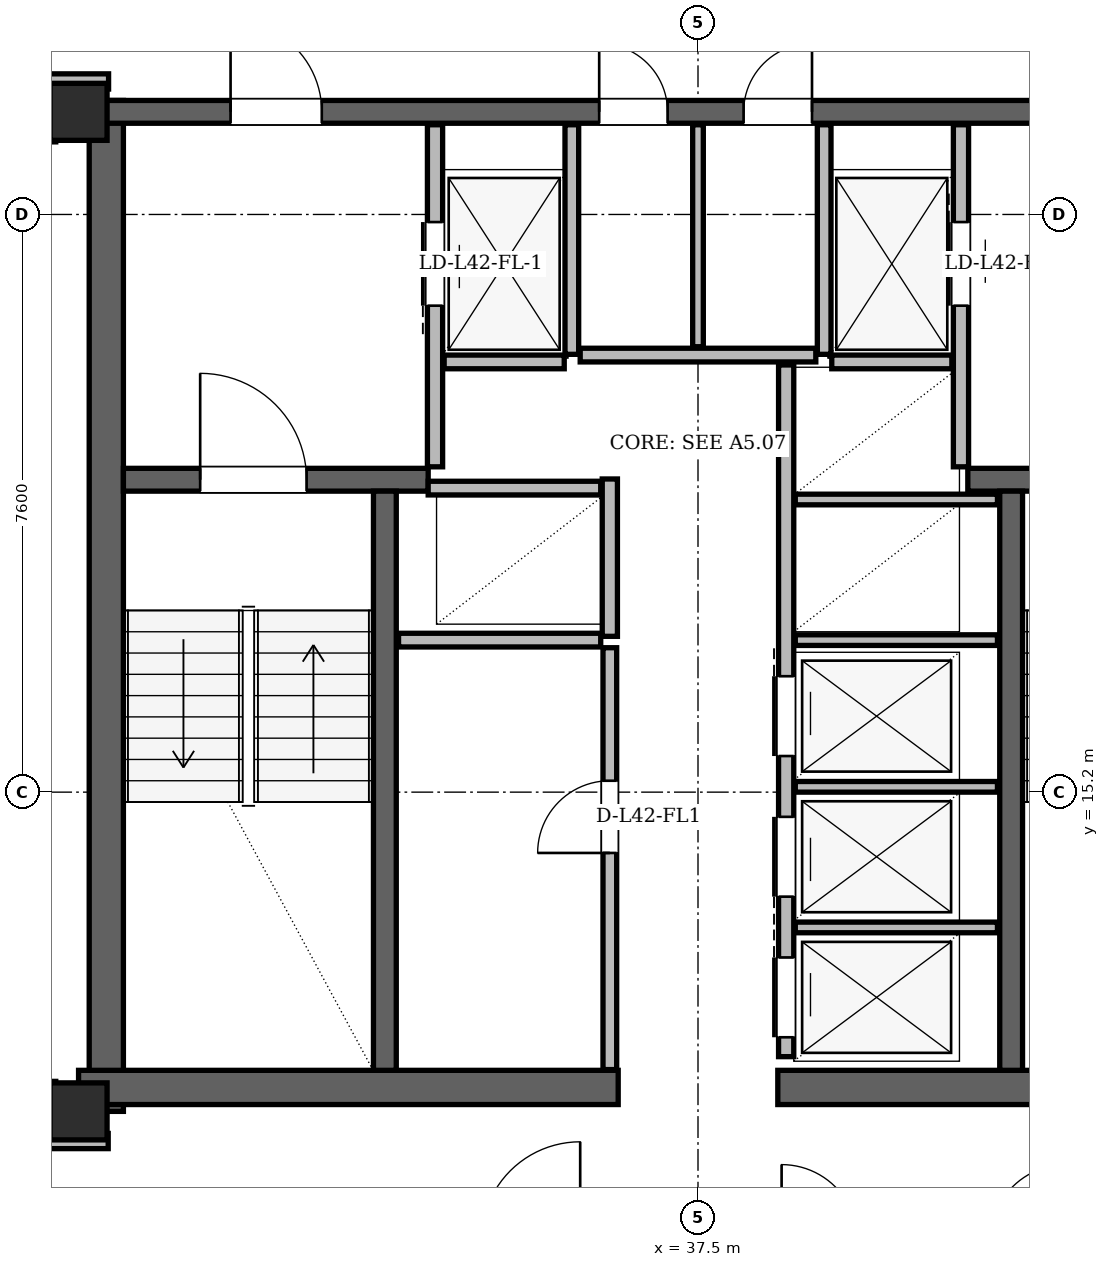
"""IFC4 building model, lengths in metres.
Left out: names, types, materials, properties, quantities, classifications, styles, units other than length and angle.
Written with IfcOpenShell. Run it as: python <this file> out.ifc"""

import sys

from ifc_helpers import new_model, si_unit, direction, frame, frame_2d, origin, origin_2d, place, context, subcontext, project, spatial, rectangle, hollow_rectangle, extrude, element, fill, save


model = new_model("IFC4")
c1 = context("Model", 3, precision=1e-05, world=origin(), true_north=direction((0.0, 1.0)))
c2 = subcontext(c1, "Body", "Model", "MODEL_VIEW")
j1 = project(units=[si_unit("LENGTHUNIT", "METRE"), si_unit("PLANEANGLEUNIT", "RADIAN")], contexts=[c1])
p1 = place(None, origin())
s1 = spatial("IfcSite", under=j1, at=p1, CompositionType="ELEMENT")
p2 = place(p1, origin())
s2 = spatial("IfcBuilding", under=s1, at=p2, CompositionType="ELEMENT")
p3 = place(p2, frame((0.0, 0.0, 160.2)))
s3 = spatial("IfcBuildingStorey", under=s2, at=p3, CompositionType="ELEMENT", Elevation=160.2)
for number, where, z_axis, x_axis in (
    (1, (29.35, 11.0, 0.0), (0.0, 0.0, 1.0), (1.0, 0.0, 0.0)),
    (2, (29.35, 24.15, 0.0), (0.0, 0.0, 1.0), (1.0, 0.0, 0.0)),
):
    element("IfcColumn", number, at=place(p3, frame(where, z_axis=z_axis, x_axis=x_axis)), inside=s3, PredefinedType="COLUMN", context=c2, shape_type="SweptSolid", body=[
        extrude(hollow_rectangle(XDim=0.75, YDim=0.75, WallThickness=0.06, at=origin_2d()), origin(), (0.0, 0.0, 1.0), 3.6),
    ])
p4 = place(p3, frame((29.715, 11.0, 0.0), z_axis=(0.0, 0.0, 1.0), x_axis=(0.0, 1.0, 0.0)))
e3 = element("IfcWall", 3, at=p4, inside=s3, PredefinedType="SHEAR", context=c2, shape_type="SweptSolid", body=[
    extrude(rectangle(XDim=13.3, YDim=0.45, at=frame_2d((6.65, 0.0))), origin(), (0.0, 0.0, 1.0), 3.38),
])
for number, where, z_axis, x_axis in (
    (4, (29.35, 11.315, 0.0), (0.0, 0.0, 1.0), (1.0, 0.0, 0.0)),
    (5, (38.55, 11.315, 0.0), (0.0, 0.0, 1.0), (1.0, 0.0, 0.0)),
):
    element("IfcWall", number, at=place(p3, frame(where, z_axis=z_axis, x_axis=x_axis)), inside=s3, PredefinedType="SHEAR", context=c2, shape_type="SweptSolid", body=[
        extrude(rectangle(XDim=7.1, YDim=0.45, at=frame_2d((3.55, 0.0))), origin(), (0.0, 0.0, 1.0), 3.38),
    ])
p5 = place(p3, frame((29.65, 24.15, 0.0), z_axis=(0.0, 0.0, 1.0), x_axis=(1.0, 0.0, 0.0)))
e6 = element("IfcWall", 6, at=p5, inside=s3, PredefinedType="SHEAR", context=c2, shape_type="SweptSolid", body=[
    extrude(rectangle(XDim=15.7, YDim=0.3, at=frame_2d((7.85, 0.0))), origin(), (0.0, 0.0, 1.0), 3.38),
])
p6 = place(p5, frame((1.7, 0.0, 0.0)))
e7 = element("IfcOpeningElement", 7, at=p6, cuts=e6, PredefinedType="OPENING", context=c2, shape_type="SweptSolid", body=[
    extrude(rectangle(XDim=1.2, YDim=2.2, at=frame_2d((0.6, 1.1))), frame((0.0, 0.15, 0.0), z_axis=(0.0, -1.0, 0.0), x_axis=(1.0, 0.0, 0.0)), (0.0, 0.0, 1.0), 0.3),
])
p7 = place(p5, frame((12.8, 0.0, 0.0)))
e8 = element("IfcOpeningElement", 8, at=p7, cuts=e6, PredefinedType="OPENING", context=c2, shape_type="SweptSolid", body=[
    extrude(rectangle(XDim=1.2, YDim=2.2, at=frame_2d((0.6, 1.1))), frame((0.0, 0.15, 0.0), z_axis=(0.0, -1.0, 0.0), x_axis=(1.0, 0.0, 0.0)), (0.0, 0.0, 1.0), 0.3),
])
p8 = place(p5, frame((6.55, 0.0, 0.0)))
e9 = element("IfcOpeningElement", 9, at=p8, cuts=e6, PredefinedType="OPENING", context=c2, shape_type="SweptSolid", body=[
    extrude(rectangle(XDim=0.9, YDim=2.05, at=frame_2d((0.45, 1.025))), frame((0.0, 0.15, 0.0), z_axis=(0.0, -1.0, 0.0), x_axis=(1.0, 0.0, 0.0)), (0.0, 0.0, 1.0), 0.3),
])
p9 = place(p5, frame((8.45, 0.0, 0.0)))
e10 = element("IfcOpeningElement", 10, at=p9, cuts=e6, PredefinedType="OPENING", context=c2, shape_type="SweptSolid", body=[
    extrude(rectangle(XDim=0.9, YDim=2.05, at=frame_2d((0.45, 1.025))), frame((0.0, 0.15, 0.0), z_axis=(0.0, -1.0, 0.0), x_axis=(1.0, 0.0, 0.0)), (0.0, 0.0, 1.0), 0.3),
])
p10 = place(p3, frame((29.94, 19.31, 0.0), z_axis=(0.0, 0.0, 1.0), x_axis=(1.0, 0.0, 0.0)))
e11 = element("IfcWall", 11, at=p10, inside=s3, PredefinedType="SHEAR", context=c2, shape_type="SweptSolid", body=[
    extrude(rectangle(XDim=4.01, YDim=0.3, at=frame_2d((2.005, 0.0))), origin(), (0.0, 0.0, 1.0), 3.38),
])
p11 = place(p10, frame((1.01, 0.0, 0.0)))
e12 = element("IfcOpeningElement", 12, at=p11, cuts=e11, PredefinedType="OPENING", context=c2, shape_type="SweptSolid", body=[
    extrude(rectangle(XDim=1.4, YDim=2.2, at=frame_2d((0.7, 1.1))), frame((0.0, 0.15, 0.0), z_axis=(0.0, -1.0, 0.0), x_axis=(1.0, 0.0, 0.0)), (0.0, 0.0, 1.0), 0.3),
])
p12 = place(p3, frame((41.05, 19.31, 0.0), z_axis=(0.0, 0.0, 1.0), x_axis=(1.0, 0.0, 0.0)))
e13 = element("IfcWall", 13, at=p12, inside=s3, PredefinedType="SHEAR", context=c2, shape_type="SweptSolid", body=[
    extrude(rectangle(XDim=4.01, YDim=0.3, at=frame_2d((2.005, 0.0))), origin(), (0.0, 0.0, 1.0), 3.38),
])
p13 = place(p12, frame((1.6, 0.0, 0.0)))
e14 = element("IfcOpeningElement", 14, at=p13, cuts=e13, PredefinedType="OPENING", context=c2, shape_type="SweptSolid", body=[
    extrude(rectangle(XDim=1.4, YDim=2.2, at=frame_2d((0.7, 1.1))), frame((0.0, 0.15, 0.0), z_axis=(0.0, -1.0, 0.0), x_axis=(1.0, 0.0, 0.0)), (0.0, 0.0, 1.0), 0.3),
])
for number, where, z_axis, x_axis in (
    (15, (33.38, 11.54, 0.0), (0.0, 0.0, 1.0), (0.0, 1.0, 0.0)),
    (16, (41.62, 11.54, 0.0), (0.0, 0.0, 1.0), (0.0, 1.0, 0.0)),
):
    element("IfcWall", number, at=place(p3, frame(where, z_axis=z_axis, x_axis=x_axis)), inside=s3, PredefinedType="SHEAR", context=c2, shape_type="SweptSolid", body=[
        extrude(rectangle(XDim=7.62, YDim=0.3, at=frame_2d((3.81, 0.0))), origin(), (0.0, 0.0, 1.0), 3.38),
    ])
p14 = place(p3, frame((32.983, 43.303, 0.0), z_axis=(0.0, 0.0, 1.0), x_axis=(-0.499995364632, -0.866028079999, 0.0)))
e17 = element("IfcWall", 17, at=p14, inside=s3, PredefinedType="SOLIDWALL", context=c2, shape_type="SweptSolid", body=[
    extrude(rectangle(XDim=35.673, YDim=0.34, at=frame_2d((17.836, 0.0))), origin(), (0.0, 0.0, 1.0), 2.6),
])
p15 = place(p14, frame((6.76, 0.0, 0.0)))
e18 = element("IfcOpeningElement", 18, at=p15, cuts=e17, PredefinedType="OPENING", context=c2, shape_type="SweptSolid", body=[
    extrude(rectangle(XDim=1.0, YDim=2.18, at=frame_2d((0.5, 1.09))), frame((0.0, 0.17, 0.0), z_axis=(0.0, -1.0, 0.0), x_axis=(1.0, 0.0, 0.0)), (0.0, 0.0, 1.0), 0.34),
])
p16 = place(p14, frame((26.558, 0.0, 0.0)))
e19 = element("IfcOpeningElement", 19, at=p16, cuts=e17, PredefinedType="OPENING", context=c2, shape_type="SweptSolid", body=[
    extrude(rectangle(XDim=1.5, YDim=2.2, at=frame_2d((0.75, 1.1))), frame((0.0, 0.17, 0.0), z_axis=(0.0, -1.0, 0.0), x_axis=(1.0, 0.0, 0.0)), (0.0, 0.0, 1.0), 0.34),
])
p17 = place(p14, frame((22.231, 0.0, 0.85)))
e20 = element("IfcOpeningElement", 20, at=p17, cuts=e17, PredefinedType="OPENING", context=c2, shape_type="SweptSolid", body=[
    extrude(rectangle(XDim=1.2, YDim=1.48, at=frame_2d((0.6, 0.74))), frame((0.0, 0.17, 0.0), z_axis=(0.0, -1.0, 0.0), x_axis=(1.0, 0.0, 0.0)), (0.0, 0.0, 1.0), 0.34),
])
p18 = place(p14, frame((11.758, 0.0, 0.85)))
e21 = element("IfcOpeningElement", 21, at=p18, cuts=e17, PredefinedType="OPENING", context=c2, shape_type="SweptSolid", body=[
    extrude(rectangle(XDim=2.2, YDim=1.64, at=frame_2d((1.1, 0.82))), frame((0.0, 0.17, 0.0), z_axis=(0.0, -1.0, 0.0), x_axis=(1.0, 0.0, 0.0)), (0.0, 0.0, 1.0), 0.34),
])
p19 = place(p14, frame((18.257, 0.0, 0.85)))
e22 = element("IfcOpeningElement", 22, at=p19, cuts=e17, PredefinedType="OPENING", context=c2, shape_type="SweptSolid", body=[
    extrude(rectangle(XDim=1.6, YDim=1.64, at=frame_2d((0.8, 0.82))), frame((0.0, 0.17, 0.0), z_axis=(0.0, -1.0, 0.0), x_axis=(1.0, 0.0, 0.0)), (0.0, 0.0, 1.0), 0.34),
])
p20 = place(p14, frame((1.108, 0.0, 0.85)))
e23 = element("IfcOpeningElement", 23, at=p20, cuts=e17, PredefinedType="OPENING", context=c2, shape_type="SweptSolid", body=[
    extrude(rectangle(XDim=1.8, YDim=1.64, at=frame_2d((0.9, 0.82))), frame((0.0, 0.17, 0.0), z_axis=(0.0, -1.0, 0.0), x_axis=(1.0, 0.0, 0.0)), (0.0, 0.0, 1.0), 0.34),
])
p21 = place(p14, frame((30.513, 0.0, 0.85)))
e24 = element("IfcOpeningElement", 24, at=p21, cuts=e17, PredefinedType="OPENING", context=c2, shape_type="SweptSolid", body=[
    extrude(rectangle(XDim=1.2, YDim=1.48, at=frame_2d((0.6, 0.74))), frame((0.0, 0.17, 0.0), z_axis=(0.0, -1.0, 0.0), x_axis=(1.0, 0.0, 0.0)), (0.0, 0.0, 1.0), 0.34),
])
p22 = place(p3, frame((34.04, 19.48, 0.0), z_axis=(0.0, 0.0, 1.0), x_axis=(0.0, 1.0, 0.0)))
e25 = element("IfcWall", 25, at=p22, inside=s3, PredefinedType="PARTITIONING", context=c2, shape_type="SweptSolid", body=[
    extrude(rectangle(XDim=4.5, YDim=0.2, at=frame_2d((2.25, 0.0))), origin(), (0.0, 0.0, 1.0), 2.42),
])
p23 = place(p22, frame((2.12, 0.0, 0.0)))
e26 = element("IfcOpeningElement", 26, at=p23, cuts=e25, PredefinedType="OPENING", context=c2, shape_type="SweptSolid", body=[
    extrude(rectangle(XDim=1.1, YDim=2.2, at=frame_2d((0.55, 1.1))), frame((0.0, 0.1, 0.0), z_axis=(0.0, -1.0, 0.0), x_axis=(1.0, 0.0, 0.0)), (0.0, 0.0, 1.0), 0.2),
])
p24 = place(p3, frame((35.84, 20.96, 0.0), z_axis=(0.0, 0.0, 1.0), x_axis=(0.0, 1.0, 0.0)))
e27 = element("IfcWall", 27, at=p24, inside=s3, PredefinedType="PARTITIONING", context=c2, shape_type="SweptSolid", body=[
    extrude(rectangle(XDim=3.02, YDim=0.18, at=frame_2d((1.51, 0.0))), origin(), (0.0, 0.0, 1.0), 2.42),
])
p25 = place(p3, frame((34.16, 20.86, 0.0), z_axis=(0.0, 0.0, 1.0), x_axis=(1.0, 0.0, 0.0)))
e28 = element("IfcWall", 28, at=p25, inside=s3, PredefinedType="PARTITIONING", context=c2, shape_type="SweptSolid", body=[
    extrude(rectangle(XDim=1.58, YDim=0.18, at=frame_2d((0.79, 0.0))), origin(), (0.0, 0.0, 1.0), 3.38),
])
p26 = place(p3, frame((40.96, 19.48, 0.0), z_axis=(0.0, 0.0, 1.0), x_axis=(0.0, 1.0, 0.0)))
e29 = element("IfcWall", 29, at=p26, inside=s3, PredefinedType="PARTITIONING", context=c2, shape_type="SweptSolid", body=[
    extrude(rectangle(XDim=4.5, YDim=0.2, at=frame_2d((2.25, 0.0))), origin(), (0.0, 0.0, 1.0), 2.42),
])
p27 = place(p26, frame((2.12, 0.0, 0.0)))
e30 = element("IfcOpeningElement", 30, at=p27, cuts=e29, PredefinedType="OPENING", context=c2, shape_type="SweptSolid", body=[
    extrude(rectangle(XDim=1.1, YDim=2.2, at=frame_2d((0.55, 1.1))), frame((0.0, 0.1, 0.0), z_axis=(0.0, -1.0, 0.0), x_axis=(1.0, 0.0, 0.0)), (0.0, 0.0, 1.0), 0.2),
])
p28 = place(p3, frame((39.16, 20.96, 0.0), z_axis=(0.0, 0.0, 1.0), x_axis=(0.0, 1.0, 0.0)))
e31 = element("IfcWall", 31, at=p28, inside=s3, PredefinedType="PARTITIONING", context=c2, shape_type="SweptSolid", body=[
    extrude(rectangle(XDim=3.02, YDim=0.18, at=frame_2d((1.51, 0.0))), origin(), (0.0, 0.0, 1.0), 2.42),
])
p29 = place(p3, frame((39.26, 20.86, 0.0), z_axis=(0.0, 0.0, 1.0), x_axis=(1.0, 0.0, 0.0)))
e32 = element("IfcWall", 32, at=p29, inside=s3, PredefinedType="PARTITIONING", context=c2, shape_type="SweptSolid", body=[
    extrude(rectangle(XDim=1.58, YDim=0.18, at=frame_2d((0.79, 0.0))), origin(), (0.0, 0.0, 1.0), 3.38),
])
p30 = place(p3, frame((36.34, 17.25, 0.0), z_axis=(0.0, 0.0, 1.0), x_axis=(0.0, 1.0, 0.0)))
e33 = element("IfcWall", 33, at=p30, inside=s3, PredefinedType="PARTITIONING", context=c2, shape_type="SweptSolid", body=[
    extrude(rectangle(XDim=2.07, YDim=0.2, at=frame_2d((1.035, 0.0))), origin(), (0.0, 0.0, 1.0), 3.38),
])
p31 = place(p3, frame((33.95, 19.2, 0.0), z_axis=(0.0, 0.0, 1.0), x_axis=(1.0, 0.0, 0.0)))
e34 = element("IfcWall", 34, at=p31, inside=s3, PredefinedType="PARTITIONING", context=c2, shape_type="SweptSolid", body=[
    extrude(rectangle(XDim=2.27, YDim=0.18, at=frame_2d((1.135, 0.0))), origin(), (0.0, 0.0, 1.0), 3.38),
])
p32 = place(p3, frame((33.56, 17.2, 0.0), z_axis=(0.0, 0.0, 1.0), x_axis=(1.0, 0.0, 0.0)))
e35 = element("IfcWall", 35, at=p32, inside=s3, PredefinedType="PARTITIONING", context=c2, shape_type="SweptSolid", body=[
    extrude(rectangle(XDim=2.66, YDim=0.18, at=frame_2d((1.33, 0.0))), origin(), (0.0, 0.0, 1.0), 3.38),
])
p33 = place(p3, frame((36.34, 11.55, 0.0), z_axis=(0.0, 0.0, 1.0), x_axis=(0.0, 1.0, 0.0)))
e36 = element("IfcWall", 36, at=p33, inside=s3, PredefinedType="PARTITIONING", context=c2, shape_type="SweptSolid", body=[
    extrude(rectangle(XDim=5.55, YDim=0.18, at=frame_2d((2.775, 0.0))), origin(), (0.0, 0.0, 1.0), 3.38),
])
p34 = place(p33, frame((2.85, 0.0, 0.0)))
e37 = element("IfcOpeningElement", 37, at=p34, cuts=e36, PredefinedType="OPENING", context=c2, shape_type="SweptSolid", body=[
    extrude(rectangle(XDim=0.95, YDim=2.1, at=frame_2d((0.475, 1.05))), frame((0.0, 0.09, 0.0), z_axis=(0.0, -1.0, 0.0), x_axis=(1.0, 0.0, 0.0)), (0.0, 0.0, 1.0), 0.18),
])
p35 = place(p3, frame((38.66, 11.72, 0.0), z_axis=(0.0, 0.0, 1.0), x_axis=(0.0, 1.0, 0.0)))
e38 = element("IfcWall", 38, at=p35, inside=s3, PredefinedType="PARTITIONING", context=c2, shape_type="SweptSolid", body=[
    extrude(rectangle(XDim=9.1, YDim=0.2, at=frame_2d((4.55, 0.0))), origin(), (0.0, 0.0, 1.0), 3.38),
])
p36 = place(p35, frame((0.255, 0.0, 0.0)))
e39 = element("IfcOpeningElement", 39, at=p36, cuts=e38, PredefinedType="OPENING", context=c2, shape_type="SweptSolid", body=[
    extrude(rectangle(XDim=1.05, YDim=2.15, at=frame_2d((0.525, 1.075))), frame((0.0, 0.1, 0.0), z_axis=(0.0, -1.0, 0.0), x_axis=(1.0, 0.0, 0.0)), (0.0, 0.0, 1.0), 0.2),
])
p37 = place(p35, frame((2.105, 0.0, 0.0)))
e40 = element("IfcOpeningElement", 40, at=p37, cuts=e38, PredefinedType="OPENING", context=c2, shape_type="SweptSolid", body=[
    extrude(rectangle(XDim=1.05, YDim=2.15, at=frame_2d((0.525, 1.075))), frame((0.0, 0.1, 0.0), z_axis=(0.0, -1.0, 0.0), x_axis=(1.0, 0.0, 0.0)), (0.0, 0.0, 1.0), 0.2),
])
p38 = place(p35, frame((3.955, 0.0, 0.0)))
e41 = element("IfcOpeningElement", 41, at=p38, cuts=e38, PredefinedType="OPENING", context=c2, shape_type="SweptSolid", body=[
    extrude(rectangle(XDim=1.05, YDim=2.15, at=frame_2d((0.525, 1.075))), frame((0.0, 0.1, 0.0), z_axis=(0.0, -1.0, 0.0), x_axis=(1.0, 0.0, 0.0)), (0.0, 0.0, 1.0), 0.2),
])
for number, where, z_axis, x_axis in (
    (42, (38.78, 13.42, 0.0), (0.0, 0.0, 1.0), (1.0, 0.0, 0.0)),
    (43, (38.78, 15.27, 0.0), (0.0, 0.0, 1.0), (1.0, 0.0, 0.0)),
    (44, (38.78, 17.2, 0.0), (0.0, 0.0, 1.0), (1.0, 0.0, 0.0)),
    (45, (38.78, 19.05, 0.0), (0.0, 0.0, 1.0), (1.0, 0.0, 0.0)),
):
    element("IfcWall", number, at=place(p3, frame(where, z_axis=z_axis, x_axis=x_axis)), inside=s3, PredefinedType="PARTITIONING", context=c2, shape_type="SweptSolid", body=[
        extrude(rectangle(XDim=2.66, YDim=0.14, at=frame_2d((1.33, 0.0))), origin(), (0.0, 0.0, 1.0), 3.38),
    ])
p39 = place(p3, frame((35.95, 20.95, 0.0), z_axis=(0.0, 0.0, 1.0), x_axis=(1.0, 0.0, 0.0)))
e46 = element("IfcWall", 46, at=p39, inside=s3, PredefinedType="PARTITIONING", context=c2, shape_type="SweptSolid", body=[
    extrude(rectangle(XDim=3.1, YDim=0.18, at=frame_2d((1.55, 0.0))), origin(), (0.0, 0.0, 1.0), 3.38),
])
p40 = place(p3, frame((37.5, 21.06, 0.0), z_axis=(0.0, 0.0, 1.0), x_axis=(0.0, 1.0, 0.0)))
e47 = element("IfcWall", 47, at=p40, inside=s3, PredefinedType="PARTITIONING", context=c2, shape_type="SweptSolid", body=[
    extrude(rectangle(XDim=2.92, YDim=0.14, at=frame_2d((1.46, 0.0))), origin(), (0.0, 0.0, 1.0), 2.42),
])
p41 = place(p3, frame((28.96, 10.61, 0.0), z_axis=(0.0, 0.0, 1.0), x_axis=(1.0, 0.0, 0.0)))
e48 = element("IfcWall", 48, at=p41, inside=s3, PredefinedType="PARTITIONING", context=c2, shape_type="SweptSolid", body=[
    extrude(rectangle(XDim=0.78, YDim=0.2, at=frame_2d((0.39, 0.0))), origin(), (0.0, 0.0, 1.0), 2.42),
])
p42 = place(p3, frame((28.955, 24.55, 0.0), z_axis=(0.0, 0.0, 1.0), x_axis=(1.0, 0.0, 0.0)))
e49 = element("IfcWall", 49, at=p42, inside=s3, PredefinedType="PARTITIONING", context=c2, shape_type="SweptSolid", body=[
    extrude(rectangle(XDim=0.79, YDim=0.2, at=frame_2d((0.395, 0.0))), origin(), (0.0, 0.0, 1.0), 2.842),
])
p43 = place(p3, frame((28.95, 10.95, 0.0), z_axis=(0.0, 0.0, 1.0), x_axis=(0.0, 1.0, 0.0)))
e50 = element("IfcWall", 50, at=p43, inside=s3, PredefinedType="PARTITIONING", context=c2, shape_type="SweptSolid", body=[
    extrude(rectangle(XDim=0.445, YDim=0.2, at=frame_2d((0.223, 0.0))), origin(), (0.0, 0.0, 1.0), 2.842),
])
p44 = place(p3, frame((28.95, 23.755, 0.0), z_axis=(0.0, 0.0, 1.0), x_axis=(0.0, 1.0, 0.0)))
e51 = element("IfcWall", 51, at=p44, inside=s3, PredefinedType="PARTITIONING", context=c2, shape_type="SweptSolid", body=[
    extrude(rectangle(XDim=0.565, YDim=0.2, at=frame_2d((0.283, 0.0))), origin(), (0.0, 0.0, 1.0), 3.38),
])
p45 = place(p34, origin())
e52 = element("IfcDoor", 52, at=p45, inside=s3, OperationType="SINGLE_SWING_LEFT", PredefinedType="DOOR", context=c2, shape_type="SweptSolid", body=[
    extrude(rectangle(XDim=0.95, YDim=2.1, at=frame_2d((0.475, 1.05))), frame((0.0, 0.025, 0.0), z_axis=(0.0, -1.0, 0.0), x_axis=(1.0, 0.0, 0.0)), (0.0, 0.0, 1.0), 0.05),
])
fill(e37, e52)
p46 = place(p23, origin())
e53 = element("IfcDoor", 53, at=p46, inside=s3, OperationType="SLIDING_TO_LEFT", PredefinedType="DOOR", context=c2, shape_type="SweptSolid", body=[
    extrude(rectangle(XDim=1.1, YDim=2.2, at=frame_2d((0.55, 1.1))), frame((0.0, 0.025, 0.0), z_axis=(0.0, -1.0, 0.0), x_axis=(1.0, 0.0, 0.0)), (0.0, 0.0, 1.0), 0.05),
])
fill(e26, e53)
p47 = place(p27, origin())
e54 = element("IfcDoor", 54, at=p47, inside=s3, OperationType="SLIDING_TO_RIGHT", PredefinedType="DOOR", context=c2, shape_type="SweptSolid", body=[
    extrude(rectangle(XDim=1.1, YDim=2.2, at=frame_2d((0.55, 1.1))), frame((0.0, 0.025, 0.0), z_axis=(0.0, -1.0, 0.0), x_axis=(1.0, 0.0, 0.0)), (0.0, 0.0, 1.0), 0.05),
])
fill(e30, e54)
p48 = place(p36, origin())
e55 = element("IfcDoor", 55, at=p48, inside=s3, OperationType="SLIDING_TO_RIGHT", PredefinedType="DOOR", context=c2, shape_type="SweptSolid", body=[
    extrude(rectangle(XDim=1.05, YDim=2.15, at=frame_2d((0.525, 1.075))), frame((0.0, 0.025, 0.0), z_axis=(0.0, -1.0, 0.0), x_axis=(1.0, 0.0, 0.0)), (0.0, 0.0, 1.0), 0.05),
])
fill(e39, e55)
p49 = place(p37, origin())
e56 = element("IfcDoor", 56, at=p49, inside=s3, OperationType="SLIDING_TO_LEFT", PredefinedType="DOOR", context=c2, shape_type="SweptSolid", body=[
    extrude(rectangle(XDim=1.05, YDim=2.15, at=frame_2d((0.525, 1.075))), frame((0.0, 0.025, 0.0), z_axis=(0.0, -1.0, 0.0), x_axis=(1.0, 0.0, 0.0)), (0.0, 0.0, 1.0), 0.05),
])
fill(e40, e56)
p50 = place(p38, origin())
e57 = element("IfcDoor", 57, at=p50, inside=s3, OperationType="SLIDING_TO_RIGHT", PredefinedType="DOOR", context=c2, shape_type="SweptSolid", body=[
    extrude(rectangle(XDim=1.05, YDim=2.15, at=frame_2d((0.525, 1.075))), frame((0.0, 0.025, 0.0), z_axis=(0.0, -1.0, 0.0), x_axis=(1.0, 0.0, 0.0)), (0.0, 0.0, 1.0), 0.05),
])
fill(e41, e57)
p51 = place(p11, origin())
e58 = element("IfcDoor", 58, at=p51, inside=s3, OperationType="SINGLE_SWING_LEFT", PredefinedType="DOOR", context=c2, shape_type="SweptSolid", body=[
    extrude(rectangle(XDim=1.4, YDim=2.2, at=frame_2d((0.7, 1.1))), frame((0.0, 0.025, 0.0), z_axis=(0.0, -1.0, 0.0), x_axis=(1.0, 0.0, 0.0)), (0.0, 0.0, 1.0), 0.05),
])
fill(e12, e58)
p52 = place(p6, origin())
e59 = element("IfcDoor", 59, at=p52, inside=s3, OperationType="SINGLE_SWING_LEFT", PredefinedType="DOOR", context=c2, shape_type="SweptSolid", body=[
    extrude(rectangle(XDim=1.2, YDim=2.2, at=frame_2d((0.6, 1.1))), frame((0.0, 0.025, 0.0), z_axis=(0.0, -1.0, 0.0), x_axis=(1.0, 0.0, 0.0)), (0.0, 0.0, 1.0), 0.05),
])
fill(e7, e59)
p53 = place(p8, origin())
e60 = element("IfcDoor", 60, at=p53, inside=s3, OperationType="SINGLE_SWING_LEFT", PredefinedType="DOOR", context=c2, shape_type="SweptSolid", body=[
    extrude(rectangle(XDim=0.9, YDim=2.05, at=frame_2d((0.45, 1.025))), frame((0.0, 0.025, 0.0), z_axis=(0.0, -1.0, 0.0), x_axis=(1.0, 0.0, 0.0)), (0.0, 0.0, 1.0), 0.05),
])
fill(e9, e60)
p54 = place(p9, origin())
e61 = element("IfcDoor", 61, at=p54, inside=s3, OperationType="SINGLE_SWING_RIGHT", PredefinedType="DOOR", context=c2, shape_type="SweptSolid", body=[
    extrude(rectangle(XDim=0.9, YDim=2.05, at=frame_2d((0.45, 1.025))), frame((0.0, 0.025, 0.0), z_axis=(0.0, -1.0, 0.0), x_axis=(1.0, 0.0, 0.0)), (0.0, 0.0, 1.0), 0.05),
])
fill(e10, e61)
save(model, sys.argv[1])
